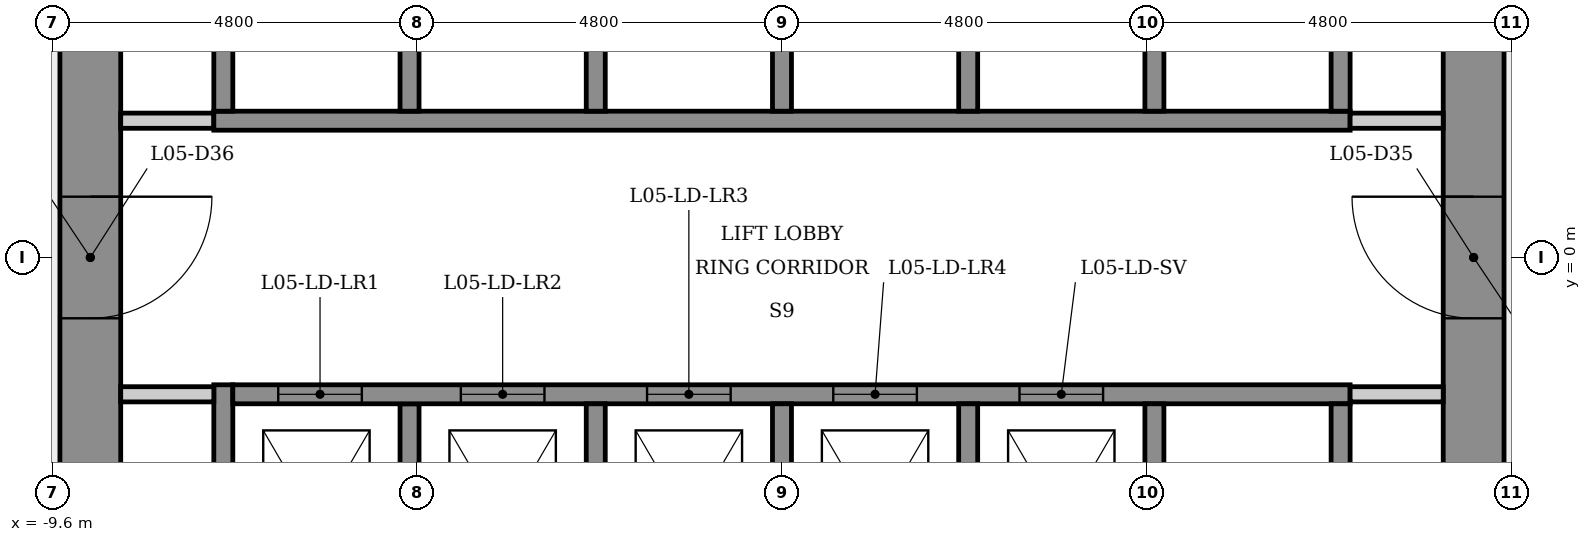
"""IFC4 building model, lengths in metres.
Left out: names, types, materials, properties, quantities, classifications, styles, units other than length and angle.
Written with IfcOpenShell. Run it as: python <this file> out.ifc"""

import sys

from ifc_helpers import new_model, si_unit, direction, frame, frame_2d, origin, place, context, subcontext, project, spatial, rectangle, extrude, element, fill, save


model = new_model("IFC4")
c1 = context("Model", 3, precision=1e-05, world=origin(), true_north=direction((0.0, 1.0)))
c2 = subcontext(c1, "Body", "Model", "MODEL_VIEW")
j1 = project(units=[si_unit("LENGTHUNIT", "METRE"), si_unit("PLANEANGLEUNIT", "RADIAN")], contexts=[c1])
p1 = place(None, origin())
s1 = spatial("IfcSite", under=j1, at=p1, CompositionType="ELEMENT")
p2 = place(p1, origin())
s2 = spatial("IfcBuilding", under=s1, at=p2, CompositionType="ELEMENT")
p3 = place(p2, frame((0.0, 0.0, 25.5)))
s3 = spatial("IfcBuildingStorey", under=s2, at=p3, CompositionType="ELEMENT", Elevation=25.5)
p4 = place(p3, frame((9.1, -5.485, 0.0), z_axis=(0.0, 0.0, 1.0), x_axis=(0.0, 1.0, 0.0)))
e1 = element("IfcWall", 1, at=p4, inside=s3, PredefinedType="SHEAR", context=c2, shape_type="SweptSolid", body=[
    extrude(rectangle(XDim=10.97, YDim=0.8, at=frame_2d((5.485, 0.0))), origin(), (0.0, 0.0, 1.0), 3.4),
])
p5 = place(p4, frame((4.685, 0.0, 0.0)))
e2 = element("IfcOpeningElement", 2, at=p5, cuts=e1, PredefinedType="OPENING", context=c2, shape_type="SweptSolid", body=[
    extrude(rectangle(XDim=1.6, YDim=2.1, at=frame_2d((0.8, 1.05))), frame((0.0, 0.41, 0.0), z_axis=(0.0, -1.0, 0.0), x_axis=(1.0, 0.0, 0.0)), (0.0, 0.0, 1.0), 0.82),
])
p6 = place(p3, frame((-9.1, 5.485, 0.0), z_axis=(0.0, 0.0, 1.0), x_axis=(0.0, -1.0, 0.0)))
e3 = element("IfcWall", 3, at=p6, inside=s3, PredefinedType="SHEAR", context=c2, shape_type="SweptSolid", body=[
    extrude(rectangle(XDim=10.97, YDim=0.8, at=frame_2d((5.485, 0.0))), origin(), (0.0, 0.0, 1.0), 3.4),
])
p7 = place(p6, frame((4.685, 0.0, 0.0)))
e4 = element("IfcOpeningElement", 4, at=p7, cuts=e3, PredefinedType="OPENING", context=c2, shape_type="SweptSolid", body=[
    extrude(rectangle(XDim=1.6, YDim=2.1, at=frame_2d((0.8, 1.05))), frame((0.0, 0.41, 0.0), z_axis=(0.0, -1.0, 0.0), x_axis=(1.0, 0.0, 0.0)), (0.0, 0.0, 1.0), 0.82),
])
p8 = place(p3, frame((-8.7, 1.8, 0.0), z_axis=(0.0, 0.0, 1.0), x_axis=(1.0, 0.0, 0.0)))
e5 = element("IfcWall", 5, at=p8, inside=s3, PredefinedType="PARTITIONING", context=c2, shape_type="SweptSolid", body=[
    extrude(rectangle(XDim=1.225, YDim=0.2, at=frame_2d((0.613, 0.0))), origin(), (0.0, 0.0, 1.0), 3.05),
])
p9 = place(p3, frame((-7.475, 1.8, 0.0), z_axis=(0.0, 0.0, 1.0), x_axis=(1.0, 0.0, 0.0)))
e6 = element("IfcWall", 6, at=p9, inside=s3, PredefinedType="SHEAR", context=c2, shape_type="SweptSolid", body=[
    extrude(rectangle(XDim=14.95, YDim=0.25, at=frame_2d((7.475, 0.0))), origin(), (0.0, 0.0, 1.0), 3.05),
])
p10 = place(p3, frame((-7.35, -5.73, 0.0), z_axis=(0.0, 0.0, 1.0), x_axis=(0.0, 1.0, 0.0)))
e7 = element("IfcWall", 7, at=p10, inside=s3, PredefinedType="SHEAR", context=c2, shape_type="SweptSolid", body=[
    extrude(rectangle(XDim=4.055, YDim=0.25, at=frame_2d((2.028, 0.0))), origin(), (0.0, 0.0, 1.0), 3.05),
])
p11 = place(p3, frame((-7.35, 1.925, 0.0), z_axis=(0.0, 0.0, 1.0), x_axis=(0.0, 1.0, 0.0)))
e8 = element("IfcWall", 8, at=p11, inside=s3, PredefinedType="SHEAR", context=c2, shape_type="SweptSolid", body=[
    extrude(rectangle(XDim=3.805, YDim=0.25, at=frame_2d((1.903, 0.0))), origin(), (0.0, 0.0, 1.0), 3.05),
])
p12 = place(p3, frame((-7.475, -1.8, 0.0), z_axis=(0.0, 0.0, 1.0), x_axis=(-1.0, 0.0, 0.0)))
e9 = element("IfcWall", 9, at=p12, inside=s3, PredefinedType="PARTITIONING", context=c2, shape_type="SweptSolid", body=[
    extrude(rectangle(XDim=1.225, YDim=0.2, at=frame_2d((0.613, 0.0))), origin(), (0.0, 0.0, 1.0), 3.05),
])
for number, where, z_axis, x_axis in (
    (10, (-4.9, -1.925, 0.0), (0.0, 0.0, 1.0), (0.0, -1.0, 0.0)),
    (11, (-4.9, 5.025, 0.0), (0.0, 0.0, 1.0), (0.0, -1.0, 0.0)),
):
    element("IfcWall", number, at=place(p3, frame(where, z_axis=z_axis, x_axis=x_axis)), inside=s3, PredefinedType="SHEAR", context=c2, shape_type="SweptSolid", body=[
        extrude(rectangle(XDim=3.1, YDim=0.25, at=frame_2d((1.55, 0.0))), origin(), (0.0, 0.0, 1.0), 3.4),
    ])
p13 = place(p3, frame((-7.225, -1.8, 0.0), z_axis=(0.0, 0.0, 1.0), x_axis=(1.0, 0.0, 0.0)))
e12 = element("IfcWall", 12, at=p13, inside=s3, PredefinedType="SHEAR", context=c2, shape_type="SweptSolid", body=[
    extrude(rectangle(XDim=14.7, YDim=0.25, at=frame_2d((7.35, 0.0))), origin(), (0.0, 0.0, 1.0), 3.05),
])
p14 = place(p13, frame((0.597, 0.0, 0.0)))
e13 = element("IfcOpeningElement", 13, at=p14, cuts=e12, PredefinedType="OPENING", context=c2, shape_type="SweptSolid", body=[
    extrude(rectangle(XDim=1.1, YDim=2.1, at=frame_2d((0.55, 1.05))), frame((0.0, 0.135, 0.0), z_axis=(0.0, -1.0, 0.0), x_axis=(1.0, 0.0, 0.0)), (0.0, 0.0, 1.0), 0.27),
])
p15 = place(p13, frame((3.0, 0.0, 0.0)))
e14 = element("IfcOpeningElement", 14, at=p15, cuts=e12, PredefinedType="OPENING", context=c2, shape_type="SweptSolid", body=[
    extrude(rectangle(XDim=1.1, YDim=2.1, at=frame_2d((0.55, 1.05))), frame((0.0, 0.135, 0.0), z_axis=(0.0, -1.0, 0.0), x_axis=(1.0, 0.0, 0.0)), (0.0, 0.0, 1.0), 0.27),
])
p16 = place(p13, frame((5.45, 0.0, 0.0)))
e15 = element("IfcOpeningElement", 15, at=p16, cuts=e12, PredefinedType="OPENING", context=c2, shape_type="SweptSolid", body=[
    extrude(rectangle(XDim=1.1, YDim=2.1, at=frame_2d((0.55, 1.05))), frame((0.0, 0.135, 0.0), z_axis=(0.0, -1.0, 0.0), x_axis=(1.0, 0.0, 0.0)), (0.0, 0.0, 1.0), 0.27),
])
p17 = place(p13, frame((7.9, 0.0, 0.0)))
e16 = element("IfcOpeningElement", 16, at=p17, cuts=e12, PredefinedType="OPENING", context=c2, shape_type="SweptSolid", body=[
    extrude(rectangle(XDim=1.1, YDim=2.1, at=frame_2d((0.55, 1.05))), frame((0.0, 0.135, 0.0), z_axis=(0.0, -1.0, 0.0), x_axis=(1.0, 0.0, 0.0)), (0.0, 0.0, 1.0), 0.27),
])
p18 = place(p13, frame((10.35, 0.0, 0.0)))
e17 = element("IfcOpeningElement", 17, at=p18, cuts=e12, PredefinedType="OPENING", context=c2, shape_type="SweptSolid", body=[
    extrude(rectangle(XDim=1.1, YDim=2.1, at=frame_2d((0.55, 1.05))), frame((0.0, 0.135, 0.0), z_axis=(0.0, -1.0, 0.0), x_axis=(1.0, 0.0, 0.0)), (0.0, 0.0, 1.0), 0.27),
])
for number, where, z_axis, x_axis in (
    (18, (-2.45, -1.925, 0.0), (0.0, 0.0, 1.0), (0.0, -1.0, 0.0)),
    (19, (-2.45, 5.025, 0.0), (0.0, 0.0, 1.0), (0.0, -1.0, 0.0)),
    (20, (0.0, -1.925, 0.0), (0.0, 0.0, 1.0), (0.0, -1.0, 0.0)),
    (21, (0.0, 5.025, 0.0), (0.0, 0.0, 1.0), (0.0, -1.0, 0.0)),
    (22, (2.45, -1.925, 0.0), (0.0, 0.0, 1.0), (0.0, -1.0, 0.0)),
    (23, (2.45, 5.025, 0.0), (0.0, 0.0, 1.0), (0.0, -1.0, 0.0)),
    (24, (4.9, -1.925, 0.0), (0.0, 0.0, 1.0), (0.0, -1.0, 0.0)),
    (25, (4.9, 5.025, 0.0), (0.0, 0.0, 1.0), (0.0, -1.0, 0.0)),
):
    element("IfcWall", number, at=place(p3, frame(where, z_axis=z_axis, x_axis=x_axis)), inside=s3, PredefinedType="SHEAR", context=c2, shape_type="SweptSolid", body=[
        extrude(rectangle(XDim=3.1, YDim=0.25, at=frame_2d((1.55, 0.0))), origin(), (0.0, 0.0, 1.0), 3.4),
    ])
p19 = place(p3, frame((7.475, 1.8, 0.0), z_axis=(0.0, 0.0, 1.0), x_axis=(1.0, 0.0, 0.0)))
e26 = element("IfcWall", 26, at=p19, inside=s3, PredefinedType="PARTITIONING", context=c2, shape_type="SweptSolid", body=[
    extrude(rectangle(XDim=1.225, YDim=0.2, at=frame_2d((0.613, 0.0))), origin(), (0.0, 0.0, 1.0), 3.05),
])
for number, where, z_axis, x_axis in (
    (27, (7.35, -1.925, 0.0), (0.0, 0.0, 1.0), (0.0, -1.0, 0.0)),
    (28, (7.35, 5.73, 0.0), (0.0, 0.0, 1.0), (0.0, -1.0, 0.0)),
):
    element("IfcWall", number, at=place(p3, frame(where, z_axis=z_axis, x_axis=x_axis)), inside=s3, PredefinedType="SHEAR", context=c2, shape_type="SweptSolid", body=[
        extrude(rectangle(XDim=3.805, YDim=0.25, at=frame_2d((1.903, 0.0))), origin(), (0.0, 0.0, 1.0), 3.05),
    ])
p20 = place(p3, frame((8.7, -1.8, 0.0), z_axis=(0.0, 0.0, 1.0), x_axis=(-1.0, 0.0, 0.0)))
e29 = element("IfcWall", 29, at=p20, inside=s3, PredefinedType="PARTITIONING", context=c2, shape_type="SweptSolid", body=[
    extrude(rectangle(XDim=1.225, YDim=0.2, at=frame_2d((0.613, 0.0))), origin(), (0.0, 0.0, 1.0), 3.05),
])
p21 = place(p14, origin())
e30 = element("IfcDoor", 30, at=p21, inside=s3, OperationType="SLIDING_TO_LEFT", PredefinedType="DOOR", context=c2, shape_type="SweptSolid", body=[
    extrude(rectangle(XDim=1.1, YDim=2.1, at=frame_2d((0.55, 1.05))), frame((0.0, 0.025, 0.0), z_axis=(0.0, -1.0, 0.0), x_axis=(1.0, 0.0, 0.0)), (0.0, 0.0, 1.0), 0.05),
])
fill(e13, e30)
p22 = place(p15, origin())
e31 = element("IfcDoor", 31, at=p22, inside=s3, OperationType="SLIDING_TO_LEFT", PredefinedType="DOOR", context=c2, shape_type="SweptSolid", body=[
    extrude(rectangle(XDim=1.1, YDim=2.1, at=frame_2d((0.55, 1.05))), frame((0.0, 0.025, 0.0), z_axis=(0.0, -1.0, 0.0), x_axis=(1.0, 0.0, 0.0)), (0.0, 0.0, 1.0), 0.05),
])
fill(e14, e31)
p23 = place(p16, origin())
e32 = element("IfcDoor", 32, at=p23, inside=s3, OperationType="SLIDING_TO_LEFT", PredefinedType="DOOR", context=c2, shape_type="SweptSolid", body=[
    extrude(rectangle(XDim=1.1, YDim=2.1, at=frame_2d((0.55, 1.05))), frame((0.0, 0.025, 0.0), z_axis=(0.0, -1.0, 0.0), x_axis=(1.0, 0.0, 0.0)), (0.0, 0.0, 1.0), 0.05),
])
fill(e15, e32)
p24 = place(p17, origin())
e33 = element("IfcDoor", 33, at=p24, inside=s3, OperationType="SLIDING_TO_LEFT", PredefinedType="DOOR", context=c2, shape_type="SweptSolid", body=[
    extrude(rectangle(XDim=1.1, YDim=2.1, at=frame_2d((0.55, 1.05))), frame((0.0, 0.025, 0.0), z_axis=(0.0, -1.0, 0.0), x_axis=(1.0, 0.0, 0.0)), (0.0, 0.0, 1.0), 0.05),
])
fill(e16, e33)
p25 = place(p18, origin())
e34 = element("IfcDoor", 34, at=p25, inside=s3, OperationType="SLIDING_TO_LEFT", PredefinedType="DOOR", context=c2, shape_type="SweptSolid", body=[
    extrude(rectangle(XDim=1.1, YDim=2.1, at=frame_2d((0.55, 1.05))), frame((0.0, 0.025, 0.0), z_axis=(0.0, -1.0, 0.0), x_axis=(1.0, 0.0, 0.0)), (0.0, 0.0, 1.0), 0.05),
])
fill(e17, e34)
p26 = place(p5, origin())
e35 = element("IfcDoor", 35, at=p26, inside=s3, OperationType="SINGLE_SWING_RIGHT", PredefinedType="DOOR", context=c2, shape_type="SweptSolid", body=[
    extrude(rectangle(XDim=1.6, YDim=2.1, at=frame_2d((0.8, 1.05))), frame((0.0, 0.025, 0.0), z_axis=(0.0, -1.0, 0.0), x_axis=(1.0, 0.0, 0.0)), (0.0, 0.0, 1.0), 0.05),
])
fill(e2, e35)
p27 = place(p7, origin())
e36 = element("IfcDoor", 36, at=p27, inside=s3, OperationType="SINGLE_SWING_LEFT", PredefinedType="DOOR", context=c2, shape_type="SweptSolid", body=[
    extrude(rectangle(XDim=1.6, YDim=2.1, at=frame_2d((0.8, 1.05))), frame((0.0, 0.025, 0.0), z_axis=(0.0, -1.0, 0.0), x_axis=(1.0, 0.0, 0.0)), (0.0, 0.0, 1.0), 0.05),
])
fill(e4, e36)
save(model, sys.argv[1])
